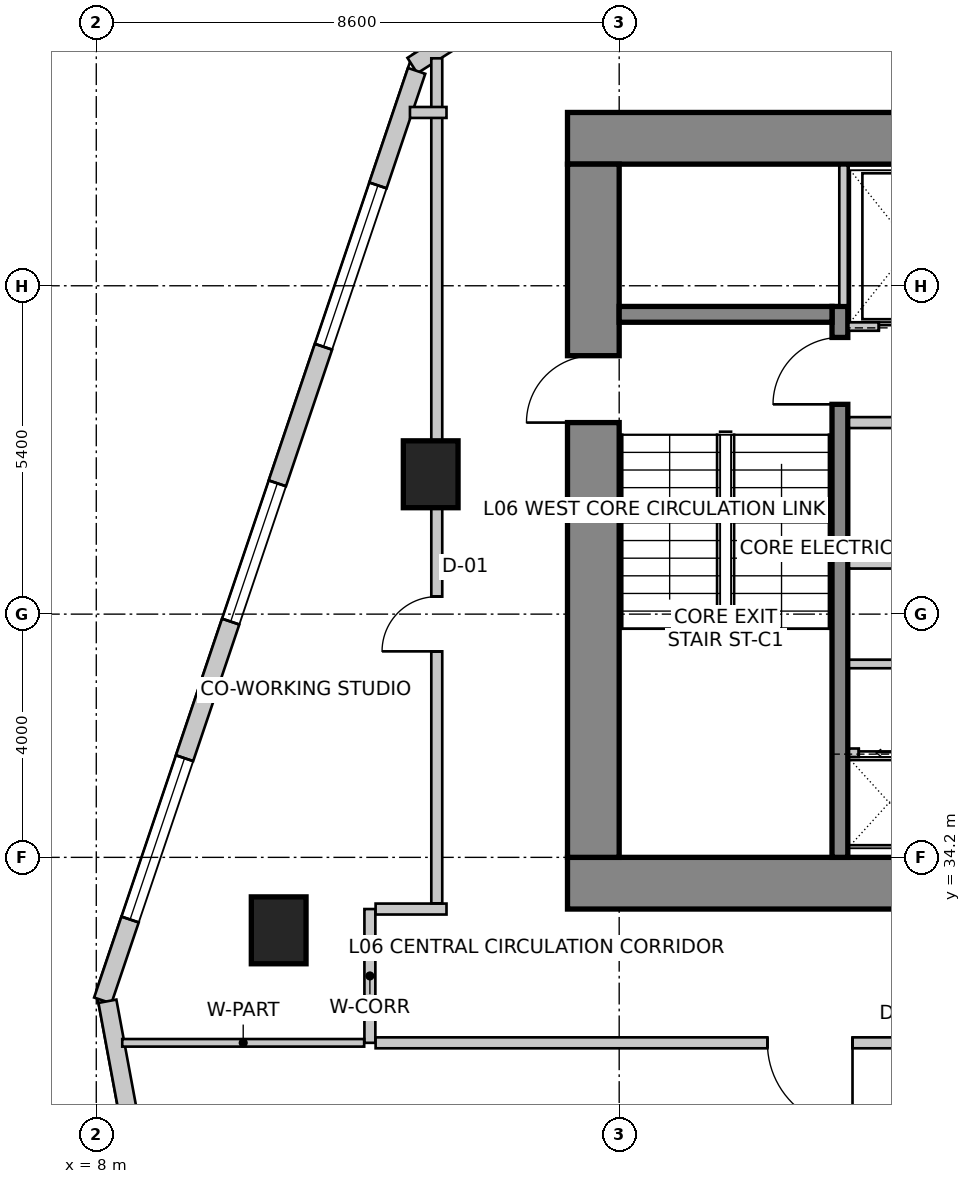
"""IFC4 building model, lengths in metres.
Left out: names, types, materials, properties, quantities, classifications, styles, units other than length and angle.
Written with IfcOpenShell. Run it as: python <this file> out.ifc"""

import sys

from ifc_helpers import new_model, si_unit, direction, frame, frame_2d, origin, origin_2d, place, context, subcontext, project, spatial, rectangle, extrude, source, transform, mapped, element, fill, save


model = new_model("IFC4")
c1 = context("Model", 3, precision=1e-05, world=origin(), true_north=direction((0.0, 1.0)))
c2 = subcontext(c1, "Body", "Model", "MODEL_VIEW")
j1 = project(units=[si_unit("LENGTHUNIT", "METRE"), si_unit("PLANEANGLEUNIT", "RADIAN")], contexts=[c1])
p1 = place(None, origin())
s1 = spatial("IfcSite", under=j1, at=p1, CompositionType="ELEMENT")
p2 = place(p1, origin())
s2 = spatial("IfcBuilding", under=s1, at=p2, CompositionType="ELEMENT")
p3 = place(p2, frame((0.0, 0.0, 27.0)))
s3 = spatial("IfcBuildingStorey", under=s2, at=p3, CompositionType="ELEMENT", Elevation=27.0)
p4 = place(p3, frame((15.75, 46.025, 0.0), z_axis=(0.0, 0.0, 1.0), x_axis=(1.0, 0.0, 0.0)))
e1 = element("IfcWall", 1, at=p4, inside=s3, PredefinedType="SHEAR", context=c2, shape_type="SweptSolid", body=[
    extrude(rectangle(XDim=16.1, YDim=0.85, at=frame_2d((8.05, 0.0))), origin(), (0.0, 0.0, 1.0), 4.0),
])
p5 = place(p3, frame((15.75, 33.775, 0.0), z_axis=(0.0, 0.0, 1.0), x_axis=(1.0, 0.0, 0.0)))
e2 = element("IfcWall", 2, at=p5, inside=s3, PredefinedType="SHEAR", context=c2, shape_type="SweptSolid", body=[
    extrude(rectangle(XDim=16.1, YDim=0.85, at=frame_2d((8.05, 0.0))), origin(), (0.0, 0.0, 1.0), 4.0),
])
m1 = source(origin(), c2, "Body", "SweptSolid", [
    extrude(rectangle(XDim=1.3, YDim=2.15, at=frame_2d((0.65, 1.075))), frame((0.0, 0.435, 0.0), z_axis=(0.0, -1.0, 0.0), x_axis=(1.0, 0.0, 0.0)), (0.0, 0.0, 1.0), 0.87),
])
p6 = place(p5, frame((10.18, 0.0, 0.0)))
e3 = element("IfcOpeningElement", 3, at=p6, cuts=e2, PredefinedType="OPENING", context=c2, shape_type="MappedRepresentation", body=[
    mapped(m1, transform((0.0, 0.0, 0.0), scale=1.0)),
])
p7 = place(p3, frame((16.175, 34.2, 0.0), z_axis=(0.0, 0.0, 1.0), x_axis=(0.0, 1.0, 0.0)))
e4 = element("IfcWall", 4, at=p7, inside=s3, PredefinedType="SHEAR", context=c2, shape_type="SweptSolid", body=[
    extrude(rectangle(XDim=11.4, YDim=0.85, at=frame_2d((5.7, 0.0))), origin(), (0.0, 0.0, 1.0), 4.0),
])
m2 = source(origin(), c2, "Body", "SweptSolid", [
    extrude(rectangle(XDim=1.1, YDim=2.15, at=frame_2d((0.55, 1.075))), frame((0.0, 0.435, 0.0), z_axis=(0.0, -1.0, 0.0), x_axis=(1.0, 0.0, 0.0)), (0.0, 0.0, 1.0), 0.87),
])
p8 = place(p7, frame((7.15, 0.0, 0.0)))
e5 = element("IfcOpeningElement", 5, at=p8, cuts=e4, PredefinedType="OPENING", context=c2, shape_type="MappedRepresentation", body=[
    mapped(m2, transform((0.0, 0.0, 0.0), scale=1.0)),
])
p9 = place(p3, frame((20.23, 34.2, 0.0), z_axis=(0.0, 0.0, 1.0), x_axis=(0.0, 1.0, 0.0)))
e6 = element("IfcWall", 6, at=p9, inside=s3, PredefinedType="SHEAR", context=c2, shape_type="SweptSolid", body=[
    extrude(rectangle(XDim=9.06, YDim=0.26, at=frame_2d((4.53, 0.0))), origin(), (0.0, 0.0, 1.0), 4.0),
])
m3 = source(origin(), c2, "Body", "SweptSolid", [
    extrude(rectangle(XDim=1.1, YDim=2.15, at=frame_2d((0.55, 1.075))), frame((0.0, 0.14, 0.0), z_axis=(0.0, -1.0, 0.0), x_axis=(1.0, 0.0, 0.0)), (0.0, 0.0, 1.0), 0.28),
])
p10 = place(p9, frame((7.45, 0.0, 0.0)))
e7 = element("IfcOpeningElement", 7, at=p10, cuts=e6, PredefinedType="OPENING", context=c2, shape_type="MappedRepresentation", body=[
    mapped(m3, transform((0.0, 0.0, 0.0), scale=1.0)),
])
p11 = place(p3, frame((16.6, 43.13, 0.0), z_axis=(0.0, 0.0, 1.0), x_axis=(1.0, 0.0, 0.0)))
e8 = element("IfcWall", 8, at=p11, inside=s3, PredefinedType="SHEAR", context=c2, shape_type="SweptSolid", body=[
    extrude(rectangle(XDim=3.5, YDim=0.26, at=frame_2d((1.75, 0.0))), origin(), (0.0, 0.0, 1.0), 4.0),
])
m4 = source(origin(), c2, "Body", "SweptSolid", [
    extrude(rectangle(XDim=0.9, YDim=1.1, at=origin_2d()), origin(), (0.0, 0.0, 1.0), 4.0),
])
for number, where, z_axis, x_axis in (
    (9, (11.0, 33.0, 0.0), (0.0, 0.0, 1.0), (1.0, 0.0, 0.0)),
    (10, (13.5, 40.5, 0.0), (0.0, 0.0, 1.0), (1.0, 0.0, 0.0)),
):
    element("IfcColumn", number, at=place(p3, frame(where, z_axis=z_axis, x_axis=x_axis)), inside=s3, PredefinedType="COLUMN", context=c2, shape_type="MappedRepresentation", body=[
        mapped(m4, transform((0.0, 0.0, 0.0), scale=1.0)),
    ])
p12 = place(p3, frame((21.875, 52.743, 0.0), z_axis=(0.0, 0.0, 1.0), x_axis=(-0.843647802826, -0.536896996441, 0.0)))
e11 = element("IfcWall", 11, at=p12, inside=s3, PredefinedType="SOLIDWALL", context=c2, shape_type="SweptSolid", body=[
    extrude(rectangle(XDim=10.284, YDim=0.3, at=frame_2d((5.142, 0.0))), origin(), (0.0, 0.0, 1.0), 3.75),
])
m5 = source(origin(), c2, "Body", "SweptSolid", [
    extrude(rectangle(XDim=0.9, YDim=1.6, at=frame_2d((0.45, 0.8))), frame((0.0, 0.16, 0.0), z_axis=(0.0, -1.0, 0.0), x_axis=(1.0, 0.0, 0.0)), (0.0, 0.0, 1.0), 0.32),
])
p13 = place(p12, frame((0.629, 0.0, 0.85)))
e12 = element("IfcOpeningElement", 12, at=p13, cuts=e11, PredefinedType="OPENING", context=c2, shape_type="MappedRepresentation", body=[
    mapped(m5, transform((0.0, 0.0, 0.0), scale=1.0)),
])
m6 = source(origin(), c2, "Body", "SweptSolid", [
    extrude(rectangle(XDim=2.4, YDim=2.2, at=frame_2d((1.2, 1.1))), frame((0.0, 0.16, 0.0), z_axis=(0.0, -1.0, 0.0), x_axis=(1.0, 0.0, 0.0)), (0.0, 0.0, 1.0), 0.32),
])
p14 = place(p12, frame((3.542, 0.0, 0.85)))
e13 = element("IfcOpeningElement", 13, at=p14, cuts=e11, PredefinedType="OPENING", context=c2, shape_type="MappedRepresentation", body=[
    mapped(m6, transform((0.0, 0.0, 0.0), scale=1.0)),
])
m7 = source(origin(), c2, "Body", "SweptSolid", [
    extrude(rectangle(XDim=1.5, YDim=1.8, at=frame_2d((0.75, 0.9))), frame((0.0, 0.16, 0.0), z_axis=(0.0, -1.0, 0.0), x_axis=(1.0, 0.0, 0.0)), (0.0, 0.0, 1.0), 0.32),
])
p15 = place(p12, frame((7.904, 0.0, 0.85)))
e14 = element("IfcOpeningElement", 14, at=p15, cuts=e11, PredefinedType="OPENING", context=c2, shape_type="MappedRepresentation", body=[
    mapped(m7, transform((0.0, 0.0, 0.0), scale=1.0)),
])
p16 = place(p3, frame((13.269, 47.134, 0.0), z_axis=(0.0, 0.0, 1.0), x_axis=(-0.319920423265, -0.947444416722, 0.0)))
e15 = element("IfcWall", 15, at=p16, inside=s3, PredefinedType="SOLIDWALL", context=c2, shape_type="SweptSolid", body=[
    extrude(rectangle(XDim=16.135, YDim=0.3, at=frame_2d((8.067, 0.0))), origin(), (0.0, 0.0, 1.0), 3.75),
])
m8 = source(origin(), c2, "Body", "SweptSolid", [
    extrude(rectangle(XDim=2.8, YDim=2.4, at=frame_2d((1.4, 1.2))), frame((0.0, 0.16, 0.0), z_axis=(0.0, -1.0, 0.0), x_axis=(1.0, 0.0, 0.0)), (0.0, 0.0, 1.0), 0.32),
])
p17 = place(p16, frame((1.988, 0.0, 0.85)))
e16 = element("IfcOpeningElement", 16, at=p17, cuts=e15, PredefinedType="OPENING", context=c2, shape_type="MappedRepresentation", body=[
    mapped(m8, transform((0.0, 0.0, 0.0), scale=1.0)),
])
p18 = place(p16, frame((7.159, 0.0, 0.85)))
e17 = element("IfcOpeningElement", 17, at=p18, cuts=e15, PredefinedType="OPENING", context=c2, shape_type="MappedRepresentation", body=[
    mapped(m6, transform((0.0, 0.0, 0.0), scale=1.0)),
])
p19 = place(p16, frame((11.93, 0.0, 0.85)))
e18 = element("IfcOpeningElement", 18, at=p19, cuts=e15, PredefinedType="OPENING", context=c2, shape_type="MappedRepresentation", body=[
    mapped(m8, transform((0.0, 0.0, 0.0), scale=1.0)),
])
p20 = place(p3, frame((8.183, 31.833, 0.0), z_axis=(0.0, 0.0, 1.0), x_axis=(0.18216364648, -0.983268226834, 0.0)))
e19 = element("IfcWall", 19, at=p20, inside=s3, PredefinedType="SOLIDWALL", context=c2, shape_type="SweptSolid", body=[
    extrude(rectangle(XDim=26.678, YDim=0.3, at=frame_2d((13.339, 0.0))), origin(), (0.0, 0.0, 1.0), 3.75),
])
p21 = place(p20, frame((2.401, 0.0, 0.85)))
e20 = element("IfcOpeningElement", 20, at=p21, cuts=e19, PredefinedType="OPENING", context=c2, shape_type="MappedRepresentation", body=[
    mapped(m6, transform((0.0, 0.0, 0.0), scale=1.0)),
])
p22 = place(p20, frame((7.529, 0.0, 0.85)))
e21 = element("IfcOpeningElement", 21, at=p22, cuts=e19, PredefinedType="OPENING", context=c2, shape_type="MappedRepresentation", body=[
    mapped(m8, transform((0.0, 0.0, 0.0), scale=1.0)),
])
p23 = place(p20, frame((13.057, 0.0, 0.85)))
e22 = element("IfcOpeningElement", 22, at=p23, cuts=e19, PredefinedType="OPENING", context=c2, shape_type="MappedRepresentation", body=[
    mapped(m6, transform((0.0, 0.0, 0.0), scale=1.0)),
])
p24 = place(p20, frame((18.411, 0.0, 0.85)))
e23 = element("IfcOpeningElement", 23, at=p24, cuts=e19, PredefinedType="OPENING", context=c2, shape_type="MappedRepresentation", body=[
    mapped(m6, transform((0.0, 0.0, 0.0), scale=1.0)),
])
p25 = place(p20, frame((22.709, 0.0, 0.85)))
e24 = element("IfcOpeningElement", 24, at=p25, cuts=e19, PredefinedType="OPENING", context=c2, shape_type="MappedRepresentation", body=[
    mapped(m8, transform((0.0, 0.0, 0.0), scale=1.0)),
])
p26 = place(p3, frame((20.37, 42.93, 0.0), z_axis=(0.0, 0.0, 1.0), x_axis=(1.0, 0.0, 0.0)))
e25 = element("IfcWall", 25, at=p26, inside=s3, PredefinedType="SOLIDWALL", context=c2, shape_type="SweptSolid", body=[
    extrude(rectangle(XDim=6.86, YDim=0.14, at=frame_2d((3.43, 0.0))), origin(), (0.0, 0.0, 1.0), 3.75),
])
m9 = source(origin(), c2, "Body", "SweptSolid", [
    extrude(rectangle(XDim=1.1, YDim=2.15, at=frame_2d((0.55, 1.075))), frame((0.0, 0.08, 0.0), z_axis=(0.0, -1.0, 0.0), x_axis=(1.0, 0.0, 0.0)), (0.0, 0.0, 1.0), 0.16),
])
p27 = place(p26, frame((0.5, 0.0, 0.0)))
e26 = element("IfcOpeningElement", 26, at=p27, cuts=e25, PredefinedType="OPENING", context=c2, shape_type="MappedRepresentation", body=[
    mapped(m9, transform((0.0, 0.0, 0.0), scale=1.0)),
])
p28 = place(p26, frame((2.7, 0.0, 0.0)))
e27 = element("IfcOpeningElement", 27, at=p28, cuts=e25, PredefinedType="OPENING", context=c2, shape_type="MappedRepresentation", body=[
    mapped(m9, transform((0.0, 0.0, 0.0), scale=1.0)),
])
p29 = place(p26, frame((5.1, 0.0, 0.0)))
e28 = element("IfcOpeningElement", 28, at=p29, cuts=e25, PredefinedType="OPENING", context=c2, shape_type="MappedRepresentation", body=[
    mapped(m9, transform((0.0, 0.0, 0.0), scale=1.0)),
])
p30 = place(p3, frame((20.29, 43.28, 0.0), z_axis=(0.0, 0.0, 1.0), x_axis=(0.0, 1.0, 0.0)))
e29 = element("IfcWall", 29, at=p30, inside=s3, PredefinedType="SOLIDWALL", context=c2, shape_type="SweptSolid", body=[
    extrude(rectangle(XDim=2.3, YDim=0.14, at=frame_2d((1.15, 0.0))), origin(), (0.0, 0.0, 1.0), 3.75),
])
p31 = place(p3, frame((20.38, 35.92, 0.0), z_axis=(0.0, 0.0, 1.0), x_axis=(1.0, 0.0, 0.0)))
e30 = element("IfcWall", 30, at=p31, inside=s3, PredefinedType="SOLIDWALL", context=c2, shape_type="SweptSolid", body=[
    extrude(rectangle(XDim=5.65, YDim=0.14, at=frame_2d((2.825, 0.0))), origin(), (0.0, 0.0, 1.0), 3.75),
])
m10 = source(origin(), c2, "Body", "SweptSolid", [
    extrude(rectangle(XDim=1.0, YDim=2.15, at=frame_2d((0.5, 1.075))), frame((0.0, 0.08, 0.0), z_axis=(0.0, -1.0, 0.0), x_axis=(1.0, 0.0, 0.0)), (0.0, 0.0, 1.0), 0.16),
])
p32 = place(p31, frame((0.16, 0.0, 0.0)))
e31 = element("IfcOpeningElement", 31, at=p32, cuts=e30, PredefinedType="OPENING", context=c2, shape_type="MappedRepresentation", body=[
    mapped(m10, transform((0.0, 0.0, 0.0), scale=1.0)),
])
p33 = place(p31, frame((1.55, 0.0, 0.0)))
e32 = element("IfcOpeningElement", 32, at=p33, cuts=e30, PredefinedType="OPENING", context=c2, shape_type="MappedRepresentation", body=[
    mapped(m10, transform((0.0, 0.0, 0.0), scale=1.0)),
])
p34 = place(p3, frame((20.38, 37.38, 0.0), z_axis=(0.0, 0.0, 1.0), x_axis=(1.0, 0.0, 0.0)))
e33 = element("IfcWall", 33, at=p34, inside=s3, PredefinedType="SOLIDWALL", context=c2, shape_type="SweptSolid", body=[
    extrude(rectangle(XDim=5.75, YDim=0.14, at=frame_2d((2.875, 0.0))), origin(), (0.0, 0.0, 1.0), 3.75),
])
p35 = place(p3, frame((20.38, 39.04, 0.0), z_axis=(0.0, 0.0, 1.0), x_axis=(1.0, 0.0, 0.0)))
e34 = element("IfcWall", 34, at=p35, inside=s3, PredefinedType="SOLIDWALL", context=c2, shape_type="SweptSolid", body=[
    extrude(rectangle(XDim=5.75, YDim=0.18, at=frame_2d((2.875, 0.0))), origin(), (0.0, 0.0, 1.0), 3.75),
])
p36 = place(p3, frame((22.96, 41.35, 0.0), z_axis=(0.0, 0.0, 1.0), x_axis=(-1.0, 0.0, 0.0)))
e35 = element("IfcWall", 35, at=p36, inside=s3, PredefinedType="PARTITIONING", context=c2, shape_type="SweptSolid", body=[
    extrude(rectangle(XDim=2.58, YDim=0.18, at=frame_2d((1.29, 0.0))), origin(), (0.0, 0.0, 1.0), 3.75),
])
p37 = place(p3, frame((12.5, 31.15, 0.0), z_axis=(0.0, 0.0, 1.0), x_axis=(0.0, 1.0, 0.0)))
e36 = element("IfcWall", 36, at=p37, inside=s3, PredefinedType="PARTITIONING", context=c2, shape_type="SweptSolid", body=[
    extrude(rectangle(XDim=2.2, YDim=0.18, at=frame_2d((1.1, 0.0))), origin(), (0.0, 0.0, 1.0), 3.335),
])
p38 = place(p3, frame((12.594, 33.35, 0.0), z_axis=(0.0, 0.0, 1.0), x_axis=(1.0, 0.0, 0.0)))
e37 = element("IfcWall", 37, at=p38, inside=s3, PredefinedType="PARTITIONING", context=c2, shape_type="SweptSolid", body=[
    extrude(rectangle(XDim=1.166, YDim=0.18, at=frame_2d((0.583, 0.0))), origin(), (0.0, 0.0, 1.0), 3.75),
])
p39 = place(p3, frame((26.76, 31.15, 0.0), z_axis=(0.0, 0.0, 1.0), x_axis=(-1.0, 0.0, 0.0)))
e38 = element("IfcWall", 38, at=p39, inside=s3, PredefinedType="PARTITIONING", context=c2, shape_type="SweptSolid", body=[
    extrude(rectangle(XDim=14.166, YDim=0.18, at=frame_2d((7.083, 0.0))), origin(), (0.0, 0.0, 1.0), 3.335),
])
m11 = source(origin(), c2, "Body", "SweptSolid", [
    extrude(rectangle(XDim=1.4, YDim=2.15, at=frame_2d((0.7, 1.075))), frame((0.0, 0.1, 0.0), z_axis=(0.0, -1.0, 0.0), x_axis=(1.0, 0.0, 0.0)), (0.0, 0.0, 1.0), 0.2),
])
p40 = place(p39, frame((6.323, 0.0, 0.0)))
e39 = element("IfcOpeningElement", 39, at=p40, cuts=e38, PredefinedType="OPENING", context=c2, shape_type="MappedRepresentation", body=[
    mapped(m11, transform((0.0, 0.0, 0.0), scale=1.0)),
])
p41 = place(p3, frame((13.6, 33.444, 0.0), z_axis=(0.0, 0.0, 1.0), x_axis=(0.0, 1.0, 0.0)))
e40 = element("IfcWall", 40, at=p41, inside=s3, PredefinedType="PARTITIONING", context=c2, shape_type="SweptSolid", body=[
    extrude(rectangle(XDim=13.896, YDim=0.18, at=frame_2d((6.948, 0.0))), origin(), (0.0, 0.0, 1.0), 2.892),
])
m12 = source(origin(), c2, "Body", "SweptSolid", [
    extrude(rectangle(XDim=0.9, YDim=2.15, at=frame_2d((0.45, 1.075))), frame((0.0, 0.1, 0.0), z_axis=(0.0, -1.0, 0.0), x_axis=(1.0, 0.0, 0.0)), (0.0, 0.0, 1.0), 0.2),
])
p42 = place(p41, frame((4.144, 0.0, 0.0)))
e41 = element("IfcOpeningElement", 41, at=p42, cuts=e40, PredefinedType="OPENING", context=c2, shape_type="MappedRepresentation", body=[
    mapped(m12, transform((0.0, 0.0, 0.0), scale=1.0)),
])
p43 = place(p3, frame((13.76, 46.45, 0.0), z_axis=(0.0, 0.0, 1.0), x_axis=(-1.0, 0.0, 0.0)))
e42 = element("IfcWall", 42, at=p43, inside=s3, PredefinedType="PARTITIONING", context=c2, shape_type="SweptSolid", body=[
    extrude(rectangle(XDim=0.601, YDim=0.18, at=frame_2d((0.301, 0.0))), origin(), (0.0, 0.0, 1.0), 3.75),
])
p44 = place(p3, frame((12.406, 31.15, 0.0), z_axis=(0.0, 0.0, 1.0), x_axis=(-1.0, 0.0, 0.0)))
e43 = element("IfcWall", 43, at=p44, inside=s3, PredefinedType="PARTITIONING", context=c2, shape_type="SweptSolid", body=[
    extrude(rectangle(XDim=3.979, YDim=0.125, at=frame_2d((1.99, 0.0))), origin(), (0.0, 0.0, 1.0), 2.892),
])
m13 = source(origin(), c2, "Body", "SweptSolid", [
    extrude(rectangle(XDim=2.8, YDim=2.4, at=frame_2d((1.4, 1.2))), frame((0.0, -0.015, 0.0), z_axis=(0.0, -1.0, 0.0), x_axis=(1.0, 0.0, 0.0)), (0.0, 0.0, 1.0), 0.06),
])
p45 = place(p17, origin())
e44 = element("IfcWindow", 44, at=p45, inside=s3, PartitioningType="SINGLE_PANEL", PredefinedType="WINDOW", context=c2, shape_type="MappedRepresentation", body=[
    mapped(m13, transform((0.0, 0.0, 0.0), scale=1.0)),
])
fill(e16, e44)
m14 = source(origin(), c2, "Body", "SweptSolid", [
    extrude(rectangle(XDim=2.4, YDim=2.2, at=frame_2d((1.2, 1.1))), frame((0.0, -0.015, 0.0), z_axis=(0.0, -1.0, 0.0), x_axis=(1.0, 0.0, 0.0)), (0.0, 0.0, 1.0), 0.06),
])
p46 = place(p18, origin())
e45 = element("IfcWindow", 45, at=p46, inside=s3, PartitioningType="SINGLE_PANEL", PredefinedType="WINDOW", context=c2, shape_type="MappedRepresentation", body=[
    mapped(m14, transform((0.0, 0.0, 0.0), scale=1.0)),
])
fill(e17, e45)
p47 = place(p19, origin())
e46 = element("IfcWindow", 46, at=p47, inside=s3, PartitioningType="SINGLE_PANEL", PredefinedType="WINDOW", context=c2, shape_type="MappedRepresentation", body=[
    mapped(m13, transform((0.0, 0.0, 0.0), scale=1.0)),
])
fill(e18, e46)
m15 = source(origin(), c2, "Body", "SweptSolid", [
    extrude(rectangle(XDim=1.1, YDim=2.15, at=frame_2d((0.55, 1.075))), frame((0.0, 0.025, 0.0), z_axis=(0.0, -1.0, 0.0), x_axis=(1.0, 0.0, 0.0)), (0.0, 0.0, 1.0), 0.05),
])
p48 = place(p27, origin())
e47 = element("IfcDoor", 47, at=p48, inside=s3, OperationType="SLIDING_TO_LEFT", PredefinedType="DOOR", context=c2, shape_type="MappedRepresentation", body=[
    mapped(m15, transform((0.0, 0.0, 0.0), scale=1.0)),
])
fill(e26, e47)
m16 = source(origin(), c2, "Body", "SweptSolid", [
    extrude(rectangle(XDim=1.0, YDim=2.15, at=frame_2d((0.5, 1.075))), frame((0.0, 0.025, 0.0), z_axis=(0.0, -1.0, 0.0), x_axis=(1.0, 0.0, 0.0)), (0.0, 0.0, 1.0), 0.05),
])
p49 = place(p32, origin())
e48 = element("IfcDoor", 48, at=p49, inside=s3, OperationType="SLIDING_TO_LEFT", PredefinedType="DOOR", context=c2, shape_type="MappedRepresentation", body=[
    mapped(m16, transform((0.0, 0.0, 0.0), scale=1.0)),
])
fill(e31, e48)
m17 = source(origin(), c2, "Body", "SweptSolid", [
    extrude(rectangle(XDim=1.1, YDim=2.15, at=frame_2d((0.55, 1.075))), frame((0.0, 0.025, 0.0), z_axis=(0.0, -1.0, 0.0), x_axis=(1.0, 0.0, 0.0)), (0.0, 0.0, 1.0), 0.05),
])
p50 = place(p10, origin())
e49 = element("IfcDoor", 49, at=p50, inside=s3, OperationType="SINGLE_SWING_LEFT", PredefinedType="DOOR", context=c2, shape_type="MappedRepresentation", body=[
    mapped(m17, transform((0.0, 0.0, 0.0), scale=1.0)),
])
fill(e7, e49)
p51 = place(p8, origin())
e50 = element("IfcDoor", 50, at=p51, inside=s3, OperationType="SINGLE_SWING_LEFT", PredefinedType="DOOR", context=c2, shape_type="MappedRepresentation", body=[
    mapped(m17, transform((0.0, 0.0, 0.0), scale=1.0)),
])
fill(e5, e50)
m18 = source(origin(), c2, "Body", "SweptSolid", [
    extrude(rectangle(XDim=0.9, YDim=2.15, at=frame_2d((0.45, 1.075))), frame((0.0, 0.025, 0.0), z_axis=(0.0, -1.0, 0.0), x_axis=(1.0, 0.0, 0.0)), (0.0, 0.0, 1.0), 0.05),
])
p52 = place(p42, origin())
e51 = element("IfcDoor", 51, at=p52, inside=s3, OperationType="SINGLE_SWING_LEFT", PredefinedType="DOOR", context=c2, shape_type="MappedRepresentation", body=[
    mapped(m18, transform((0.0, 0.0, 0.0), scale=1.0)),
])
fill(e41, e51)
m19 = source(origin(), c2, "Body", "SweptSolid", [
    extrude(rectangle(XDim=1.4, YDim=2.15, at=frame_2d((0.7, 1.075))), frame((0.0, 0.025, 0.0), z_axis=(0.0, -1.0, 0.0), x_axis=(1.0, 0.0, 0.0)), (0.0, 0.0, 1.0), 0.05),
])
p53 = place(p40, origin())
e52 = element("IfcDoor", 52, at=p53, inside=s3, OperationType="SINGLE_SWING_LEFT", PredefinedType="DOOR", context=c2, shape_type="MappedRepresentation", body=[
    mapped(m19, transform((0.0, 0.0, 0.0), scale=1.0)),
])
fill(e39, e52)
save(model, sys.argv[1])
